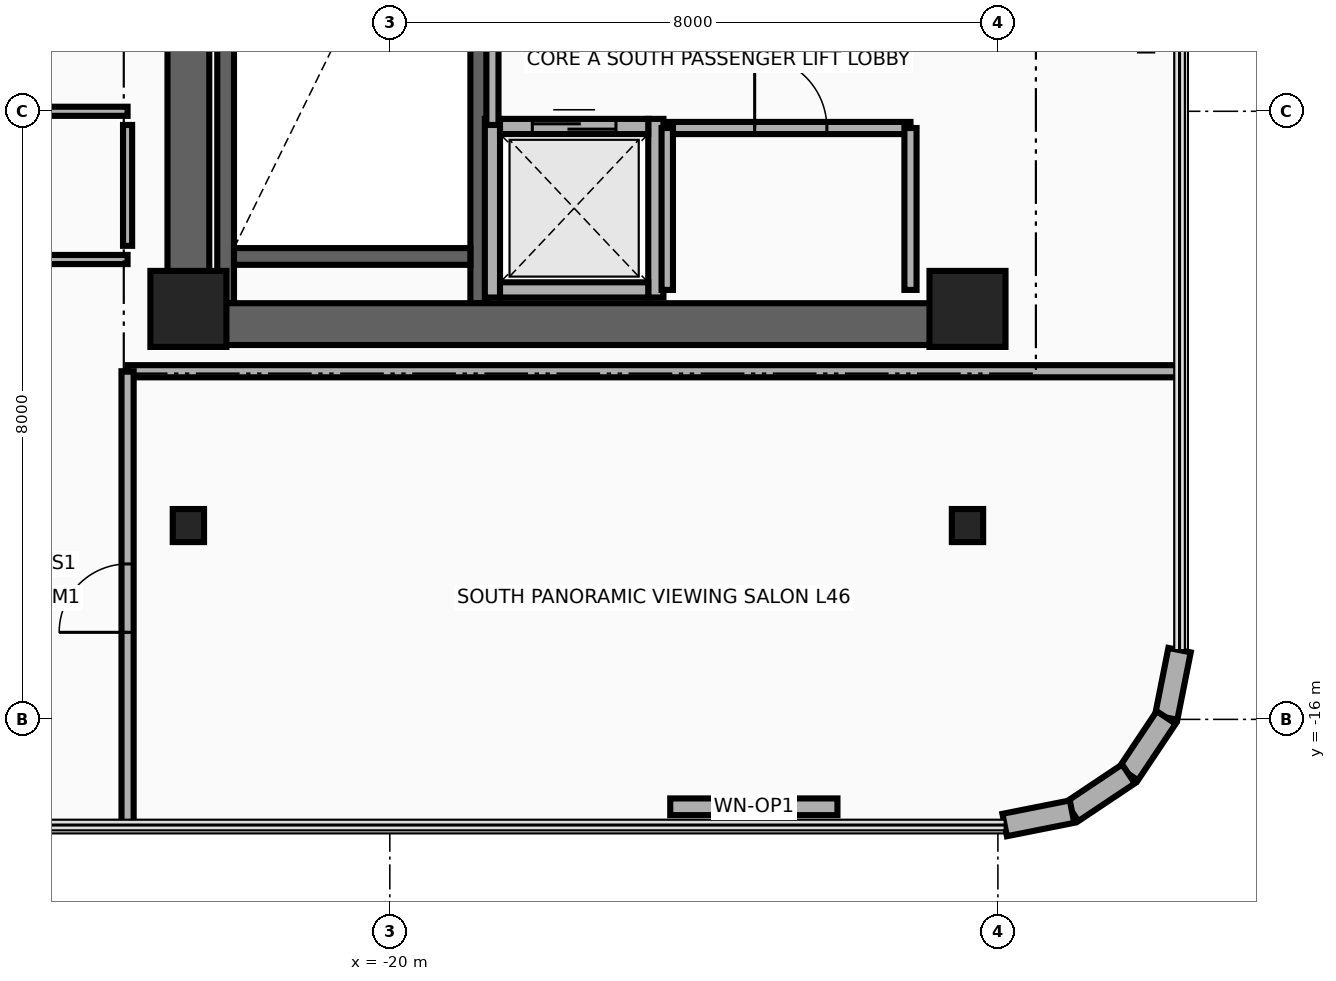
"""IFC4 building model, lengths in metres.
Left out: names, types, materials, properties, quantities, classifications, styles, units other than length and angle.
Written with IfcOpenShell. Run it as: python <this file> out.ifc"""

import sys

from ifc_helpers import new_model, si_unit, direction, frame, frame_2d, origin, origin_2d, place, context, subcontext, project, spatial, rectangle, i_section, extrude, source, transform, mapped, element, fill, save


model = new_model("IFC4")
c1 = context("Model", 3, precision=1e-05, world=origin(), true_north=direction((0.0, 1.0)))
c2 = subcontext(c1, "Body", "Model", "MODEL_VIEW")
j1 = project(units=[si_unit("LENGTHUNIT", "METRE"), si_unit("PLANEANGLEUNIT", "RADIAN")], contexts=[c1])
p1 = place(None, origin())
s1 = spatial("IfcSite", under=j1, at=p1, CompositionType="ELEMENT")
p2 = place(p1, origin())
s2 = spatial("IfcBuilding", under=s1, at=p2, CompositionType="ELEMENT")
p3 = place(p2, frame((0.0, 0.0, 180.5)))
s3 = spatial("IfcBuildingStorey", under=s2, at=p3, CompositionType="ELEMENT", Elevation=180.5)
for number, where, z_axis, x_axis in (
    (1, (-22.16, -10.525, 0.0), (0.0, 0.0, 1.0), (0.0, 1.0, 0.0)),
    (2, (-18.83, -10.525, 0.0), (0.0, 0.0, 1.0), (0.0, 1.0, 0.0)),
):
    element("IfcWall", number, at=place(p3, frame(where, z_axis=z_axis, x_axis=x_axis)), inside=s3, PredefinedType="SHEAR", context=c2, shape_type="SweptSolid", body=[
        extrude(rectangle(XDim=8.745, YDim=0.22, at=frame_2d((4.373, 0.0))), origin(), (0.0, 0.0, 1.0), 3.63),
    ])
p4 = place(p3, frame((-22.05, -9.91, 0.0), z_axis=(0.0, 0.0, 1.0), x_axis=(1.0, 0.0, 0.0)))
e3 = element("IfcWall", 3, at=p4, inside=s3, PredefinedType="SHEAR", context=c2, shape_type="SweptSolid", body=[
    extrude(rectangle(XDim=3.11, YDim=0.22, at=frame_2d((1.555, 0.0))), origin(), (0.0, 0.0, 1.0), 3.63),
])
p5 = place(p3, frame((-22.65, -11.075, 0.0), z_axis=(0.0, 0.0, 1.0), x_axis=(0.0, 1.0, 0.0)))
e4 = element("IfcWall", 4, at=p5, inside=s3, PredefinedType="SHEAR", context=c2, shape_type="SweptSolid", body=[
    extrude(rectangle(XDim=22.15, YDim=0.55, at=frame_2d((11.075, 0.0))), origin(), (0.0, 0.0, 1.0), 3.63),
])
p6 = place(p3, frame((-22.65, -10.8, 0.0), z_axis=(0.0, 0.0, 1.0), x_axis=(1.0, 0.0, 0.0)))
e5 = element("IfcWall", 5, at=p6, inside=s3, PredefinedType="SHEAR", context=c2, shape_type="SweptSolid", body=[
    extrude(rectangle(XDim=10.25, YDim=0.55, at=frame_2d((5.125, 0.0))), origin(), (0.0, 0.0, 1.0), 3.63),
])
m1 = source(origin(), c2, "Body", "SweptSolid", [
    extrude(rectangle(XDim=1.0, YDim=1.0, at=origin_2d()), origin(), (0.0, 0.0, 1.0), 3.95),
])
for number, where, z_axis, x_axis in (
    (6, (-22.65, -10.6, 0.0), (0.0, 0.0, 1.0), (1.0, 0.0, 0.0)),
    (7, (-12.4, -10.6, 0.0), (0.0, 0.0, 1.0), (1.0, 0.0, 0.0)),
):
    element("IfcColumn", number, at=place(p3, frame(where, z_axis=z_axis, x_axis=x_axis)), inside=s3, PredefinedType="COLUMN", context=c2, shape_type="MappedRepresentation", body=[
        mapped(m1, transform((0.0, 0.0, 0.0), x_axis=(1.0, 0.0, 0.0), y_axis=(0.0, 1.0, 0.0), z_axis=(0.0, 0.0, 1.0), scale=1.0)),
    ])
m2 = source(origin(), c2, "Body", "SweptSolid", [
    extrude(i_section(OverallWidth=0.412, OverallDepth=0.435, WebThickness=0.036, FlangeThickness=0.057, at=origin_2d()), origin(), (0.0, 0.0, 1.0), 3.95),
])
for number, where, z_axis, x_axis in (
    (8, (-22.65, -13.45, 0.0), (0.0, 0.0, 1.0), (1.0, 0.0, 0.0)),
    (9, (-12.4, -13.45, 0.0), (0.0, 0.0, 1.0), (1.0, 0.0, 0.0)),
):
    element("IfcColumn", number, at=place(p3, frame(where, z_axis=z_axis, x_axis=x_axis)), inside=s3, PredefinedType="COLUMN", context=c2, shape_type="MappedRepresentation", body=[
        mapped(m2, transform((0.0, 0.0, 0.0), x_axis=(1.0, 0.0, 0.0), y_axis=(0.0, 1.0, 0.0), z_axis=(0.0, 0.0, 1.0), scale=1.0)),
    ])
p7 = place(p3, frame((-9.61, -15.089, 0.0), z_axis=(0.0, 0.0, 1.0), x_axis=(-0.195025152871, -0.980798241101, 0.0)))
e10 = element("IfcWall", 10, at=p7, inside=s3, PredefinedType="SOLIDWALL", context=c2, shape_type="SweptSolid", body=[
    extrude(rectangle(XDim=0.904, YDim=0.3, at=frame_2d((0.452, 0.0))), origin(), (0.0, 0.0, 1.0), 3.63),
])
for number, where, z_axis, x_axis in (
    (11, (-9.786, -15.976, 0.0), (0.0, 0.0, 1.0), (-0.556, -0.832, 0.0)),
    (12, (-10.282, -16.718, 0.0), (0.0, 0.0, 1.0), (-0.832, -0.556, 0.0)),
):
    element("IfcWall", number, at=place(p3, frame(where, z_axis=z_axis, x_axis=x_axis)), inside=s3, PredefinedType="SOLIDWALL", context=c2, shape_type="SweptSolid", body=[
        extrude(rectangle(XDim=0.893, YDim=0.3, at=frame_2d((0.446, 0.0))), origin(), (0.0, 0.0, 1.0), 3.63),
    ])
p8 = place(p3, frame((-11.024, -17.214, 0.0), z_axis=(0.0, 0.0, 1.0), x_axis=(-0.980798241101, -0.195025152871, 0.0)))
e13 = element("IfcWall", 13, at=p8, inside=s3, PredefinedType="SOLIDWALL", context=c2, shape_type="SweptSolid", body=[
    extrude(rectangle(XDim=0.904, YDim=0.3, at=frame_2d((0.452, 0.0))), origin(), (0.0, 0.0, 1.0), 3.63),
])
p9 = place(p3, frame((-14.111, -17.15, 0.0), z_axis=(0.0, 0.0, 1.0), x_axis=(-1.0, 0.0, 0.0)))
e14 = element("IfcWall", 14, at=p9, inside=s3, PredefinedType="SOLIDWALL", context=c2, shape_type="SweptSolid", body=[
    extrude(rectangle(XDim=2.2, YDim=0.22, at=frame_2d((1.1, 0.0))), origin(), (0.0, 0.0, 1.0), 3.63),
])
p10 = place(p9, frame((0.65, 0.0, 0.95)))
e15 = element("IfcOpeningElement", 15, at=p10, cuts=e14, PredefinedType="OPENING", context=c2, shape_type="SweptSolid", body=[
    extrude(rectangle(XDim=0.9, YDim=1.3, at=frame_2d((0.45, 0.65))), frame((0.0, 0.125, 0.0), z_axis=(0.0, -1.0, 0.0), x_axis=(1.0, 0.0, 0.0)), (0.0, 0.0, 1.0), 0.25),
])
for number, where, z_axis, x_axis in (
    (16, (-18.65, -10.45, 0.0), (0.0, 0.0, 1.0), (0.0, 1.0, 0.0)),
    (17, (-16.5, -10.45, 0.0), (0.0, 0.0, 1.0), (0.0, 1.0, 0.0)),
):
    element("IfcWall", number, at=place(p3, frame(where, z_axis=z_axis, x_axis=x_axis)), inside=s3, PredefinedType="MOVABLE", context=c2, shape_type="SweptSolid", body=[
        extrude(rectangle(XDim=2.35, YDim=0.2, at=frame_2d((1.175, 0.0))), origin(), (0.0, 0.0, 1.0), 2.665),
    ])
p11 = place(p3, frame((-18.55, -10.35, 0.0), z_axis=(0.0, 0.0, 1.0), x_axis=(1.0, 0.0, 0.0)))
e18 = element("IfcWall", 18, at=p11, inside=s3, PredefinedType="MOVABLE", context=c2, shape_type="SweptSolid", body=[
    extrude(rectangle(XDim=1.95, YDim=0.2, at=frame_2d((0.975, 0.0))), origin(), (0.0, 0.0, 1.0), 2.665),
])
p12 = place(p3, frame((-18.55, -8.2, 0.0), z_axis=(0.0, 0.0, 1.0), x_axis=(1.0, 0.0, 0.0)))
e19 = element("IfcWall", 19, at=p12, inside=s3, PredefinedType="MOVABLE", context=c2, shape_type="SweptSolid", body=[
    extrude(rectangle(XDim=1.95, YDim=0.2, at=frame_2d((0.975, 0.0))), origin(), (0.0, 0.0, 1.0), 3.63),
])
p13 = place(p12, frame((0.425, 0.0, 0.0)))
e20 = element("IfcOpeningElement", 20, at=p13, cuts=e19, PredefinedType="OPENING", context=c2, shape_type="SweptSolid", body=[
    extrude(rectangle(XDim=1.1, YDim=2.1, at=frame_2d((0.55, 1.05))), frame((0.0, 0.115, 0.0), z_axis=(0.0, -1.0, 0.0), x_axis=(1.0, 0.0, 0.0)), (0.0, 0.0, 1.0), 0.23),
])
p14 = place(p3, frame((-18.65, -8.18, 0.0), z_axis=(0.0, 0.0, 1.0), x_axis=(0.0, 1.0, 0.0)))
e21 = element("IfcWall", 21, at=p14, inside=s3, PredefinedType="PARTITIONING", context=c2, shape_type="SweptSolid", body=[
    extrude(rectangle(XDim=1.56, YDim=0.16, at=frame_2d((0.78, 0.0))), origin(), (0.0, 0.0, 1.0), 3.63),
])
p15 = place(p3, frame((-16.35, -8.22, 0.0), z_axis=(0.0, 0.0, 1.0), x_axis=(1.0, 0.0, 0.0)))
e22 = element("IfcWall", 22, at=p15, inside=s3, PredefinedType="PARTITIONING", context=c2, shape_type="SweptSolid", body=[
    extrude(rectangle(XDim=3.2, YDim=0.16, at=frame_2d((1.6, 0.0))), origin(), (0.0, 0.0, 1.0), 3.63),
])
p16 = place(p15, frame((1.15, 0.0, 0.0)))
e23 = element("IfcOpeningElement", 23, at=p16, cuts=e22, PredefinedType="OPENING", context=c2, shape_type="SweptSolid", body=[
    extrude(rectangle(XDim=0.95, YDim=2.15, at=frame_2d((0.475, 1.075))), frame((0.0, 0.095, 0.0), z_axis=(0.0, -1.0, 0.0), x_axis=(1.0, 0.0, 0.0)), (0.0, 0.0, 1.0), 0.19),
])
p17 = place(p3, frame((-16.35, -10.35, 0.0), z_axis=(0.0, 0.0, 1.0), x_axis=(0.0, 1.0, 0.0)))
e24 = element("IfcWall", 24, at=p17, inside=s3, PredefinedType="PARTITIONING", context=c2, shape_type="SweptSolid", body=[
    extrude(rectangle(XDim=2.13, YDim=0.15, at=frame_2d((1.065, 0.0))), origin(), (0.0, 0.0, 1.0), 3.63),
])
p18 = place(p3, frame((-13.15, -10.35, 0.0), z_axis=(0.0, 0.0, 1.0), x_axis=(0.0, 1.0, 0.0)))
e25 = element("IfcWall", 25, at=p18, inside=s3, PredefinedType="PARTITIONING", context=c2, shape_type="SweptSolid", body=[
    extrude(rectangle(XDim=2.13, YDim=0.16, at=frame_2d((1.065, 0.0))), origin(), (0.0, 0.0, 1.0), 3.63),
])
p19 = place(p3, frame((-23.45, -11.42, 0.0), z_axis=(0.0, 0.0, 1.0), x_axis=(1.0, 0.0, 0.0)))
e26 = element("IfcWall", 26, at=p19, inside=s3, PredefinedType="PARTITIONING", context=c2, shape_type="SweptSolid", body=[
    extrude(rectangle(XDim=13.84, YDim=0.16, at=frame_2d((6.92, 0.0))), origin(), (0.0, 0.0, 1.0), 3.004),
])
p20 = place(p3, frame((-23.45, -17.39, 0.0), z_axis=(0.0, 0.0, 1.0), x_axis=(0.0, 1.0, 0.0)))
e27 = element("IfcWall", 27, at=p20, inside=s3, PredefinedType="PARTITIONING", context=c2, shape_type="SweptSolid", body=[
    extrude(rectangle(XDim=5.97, YDim=0.16, at=frame_2d((2.985, 0.0))), origin(), (0.0, 0.0, 1.0), 3.63),
])
p21 = place(p20, frame((2.535, 0.0, 0.0)))
e28 = element("IfcOpeningElement", 28, at=p21, cuts=e27, PredefinedType="OPENING", context=c2, shape_type="SweptSolid", body=[
    extrude(rectangle(XDim=0.9, YDim=2.1, at=frame_2d((0.45, 1.05))), frame((0.0, 0.095, 0.0), z_axis=(0.0, -1.0, 0.0), x_axis=(1.0, 0.0, 0.0)), (0.0, 0.0, 1.0), 0.19),
])
for number, where, z_axis, x_axis in (
    (29, (-27.468, -8.0, 0.0), (0.0, 0.0, 1.0), (1.0, 0.0, 0.0)),
    (30, (-27.468, -9.95, 0.0), (0.0, 0.0, 1.0), (1.0, 0.0, 0.0)),
):
    element("IfcWall", number, at=place(p3, frame(where, z_axis=z_axis, x_axis=x_axis)), inside=s3, PredefinedType="PARTITIONING", context=c2, shape_type="SweptSolid", body=[
        extrude(rectangle(XDim=4.018, YDim=0.12, at=frame_2d((2.009, 0.0))), origin(), (0.0, 0.0, 1.0), 3.63),
    ])
p22 = place(p3, frame((-23.45, -9.77, 0.0), z_axis=(0.0, 0.0, 1.0), x_axis=(0.0, 1.0, 0.0)))
e31 = element("IfcWall", 31, at=p22, inside=s3, PredefinedType="PARTITIONING", context=c2, shape_type="SweptSolid", body=[
    extrude(rectangle(XDim=1.59, YDim=0.12, at=frame_2d((0.795, 0.0))), origin(), (0.0, 0.0, 1.0), 3.158),
])
p23 = place(p10, origin())
e32 = element("IfcWindow", 32, at=p23, inside=s3, PartitioningType="SINGLE_PANEL", PredefinedType="WINDOW", context=c2, shape_type="SweptSolid", body=[
    extrude(rectangle(XDim=0.9, YDim=1.3, at=frame_2d((0.45, 0.65))), frame((0.0, 0.03, 0.0), z_axis=(0.0, -1.0, 0.0), x_axis=(1.0, 0.0, 0.0)), (0.0, 0.0, 1.0), 0.06),
])
fill(e15, e32)
p24 = place(p13, origin())
e33 = element("IfcDoor", 33, at=p24, inside=s3, OperationType="DOUBLE_DOOR_SLIDING", PredefinedType="DOOR", context=c2, shape_type="SweptSolid", body=[
    extrude(rectangle(XDim=1.1, YDim=2.1, at=frame_2d((0.55, 1.05))), frame((0.0, 0.025, 0.0), z_axis=(0.0, -1.0, 0.0), x_axis=(1.0, 0.0, 0.0)), (0.0, 0.0, 1.0), 0.05),
])
fill(e20, e33)
p25 = place(p16, origin())
e34 = element("IfcDoor", 34, at=p25, inside=s3, OperationType="SINGLE_SWING_RIGHT", PredefinedType="DOOR", context=c2, shape_type="SweptSolid", body=[
    extrude(rectangle(XDim=0.95, YDim=2.15, at=frame_2d((0.475, 1.075))), frame((0.0, 0.025, 0.0), z_axis=(0.0, -1.0, 0.0), x_axis=(1.0, 0.0, 0.0)), (0.0, 0.0, 1.0), 0.05),
])
fill(e23, e34)
p26 = place(p21, origin())
e35 = element("IfcDoor", 35, at=p26, inside=s3, OperationType="SINGLE_SWING_RIGHT", PredefinedType="DOOR", context=c2, shape_type="SweptSolid", body=[
    extrude(rectangle(XDim=0.9, YDim=2.1, at=frame_2d((0.45, 1.05))), frame((0.0, 0.025, 0.0), z_axis=(0.0, -1.0, 0.0), x_axis=(1.0, 0.0, 0.0)), (0.0, 0.0, 1.0), 0.05),
])
fill(e28, e35)
save(model, sys.argv[1])
